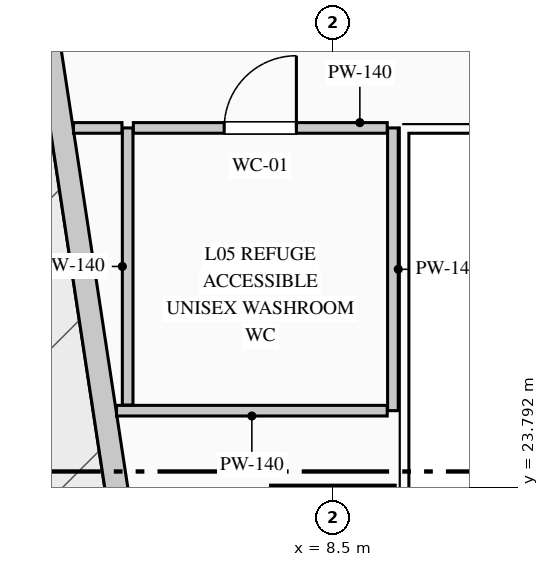
"""IFC4 building model, lengths in metres.
Left out: names, types, materials, properties, quantities, classifications, styles, units other than length and angle.
Written with IfcOpenShell. Run it as: python <this file> out.ifc"""

import sys

from ifc_helpers import new_model, si_unit, direction, frame, frame_2d, origin, place, context, subcontext, project, spatial, rectangle, extrude, element, fill, save


model = new_model("IFC4")
c1 = context("Model", 3, precision=1e-05, world=origin(), true_north=direction((0.0, 1.0)))
c2 = subcontext(c1, "Body", "Model", "MODEL_VIEW")
j1 = project(units=[si_unit("LENGTHUNIT", "METRE"), si_unit("PLANEANGLEUNIT", "RADIAN")], contexts=[c1])
p1 = place(None, origin())
s1 = spatial("IfcSite", under=j1, at=p1, CompositionType="ELEMENT")
p2 = place(p1, origin())
s2 = spatial("IfcBuilding", under=s1, at=p2, CompositionType="ELEMENT")
p3 = place(p2, frame((0.0, 0.0, 21.6)))
s3 = spatial("IfcBuildingStorey", under=s2, at=p3, CompositionType="ELEMENT", Elevation=21.6)
p4 = place(p3, frame((8.531, 4.85, 0.0), z_axis=(0.0, 0.0, 1.0), x_axis=(-0.150391137476, 0.988626575492, 0.0)))
e1 = element("IfcWall", 1, at=p4, inside=s3, PredefinedType="STANDARD", context=c2, shape_type="SweptSolid", body=[
    extrude(rectangle(XDim=36.718, YDim=0.3, at=frame_2d((18.359, 0.0))), origin(), (0.0, 0.0, 1.0), 5.0),
])
p5 = place(p3, frame((9.29, 28.52, 0.0), z_axis=(0.0, 0.0, 1.0), x_axis=(0.0, -1.0, 0.0)))
e2 = element("IfcWall", 2, at=p5, inside=s3, PredefinedType="PARTITIONING", context=c2, shape_type="SweptSolid", body=[
    extrude(rectangle(XDim=3.72, YDim=0.14, at=frame_2d((1.86, 0.0))), origin(), (0.0, 0.0, 1.0), 4.785),
])
p6 = place(p3, frame((9.215, 24.8, 0.0), z_axis=(0.0, 0.0, 1.0), x_axis=(-1.0, 0.0, 0.0)))
e3 = element("IfcWall", 3, at=p6, inside=s3, PredefinedType="PARTITIONING", context=c2, shape_type="SweptSolid", body=[
    extrude(rectangle(XDim=3.562, YDim=0.14, at=frame_2d((1.781, 0.0))), origin(), (0.0, 0.0, 1.0), 5.0),
])
p7 = place(p3, frame((5.8, 24.875, 0.0), z_axis=(0.0, 0.0, 1.0), x_axis=(0.0, 1.0, 0.0)))
e4 = element("IfcWall", 4, at=p7, inside=s3, PredefinedType="PARTITIONING", context=c2, shape_type="SweptSolid", body=[
    extrude(rectangle(XDim=3.645, YDim=0.14, at=frame_2d((1.823, 0.0))), origin(), (0.0, 0.0, 1.0), 5.0),
])
p8 = place(p3, frame((5.087, 28.52, 0.0), z_axis=(0.0, 0.0, 1.0), x_axis=(1.0, 0.0, 0.0)))
e5 = element("IfcWall", 5, at=p8, inside=s3, PredefinedType="PARTITIONING", context=c2, shape_type="SweptSolid", body=[
    extrude(rectangle(XDim=0.638, YDim=0.14, at=frame_2d((0.319, 0.0))), origin(), (0.0, 0.0, 1.0), 5.0),
])
p9 = place(p3, frame((5.875, 28.52, 0.0), z_axis=(0.0, 0.0, 1.0), x_axis=(1.0, 0.0, 0.0)))
e6 = element("IfcWall", 6, at=p9, inside=s3, PredefinedType="PARTITIONING", context=c2, shape_type="SweptSolid", body=[
    extrude(rectangle(XDim=3.34, YDim=0.14, at=frame_2d((1.67, 0.0))), origin(), (0.0, 0.0, 1.0), 5.0),
])
p10 = place(p9, frame((1.195, 0.0, 0.0)))
e7 = element("IfcOpeningElement", 7, at=p10, cuts=e6, PredefinedType="OPENING", context=c2, shape_type="SweptSolid", body=[
    extrude(rectangle(XDim=0.95, YDim=2.15, at=frame_2d((0.475, 1.075))), frame((0.0, 0.08, 0.0), z_axis=(0.0, -1.0, 0.0), x_axis=(1.0, 0.0, 0.0)), (0.0, 0.0, 1.0), 0.16),
])
p11 = place(p10, origin())
e8 = element("IfcDoor", 8, at=p11, inside=s3, OperationType="SINGLE_SWING_RIGHT", PredefinedType="DOOR", context=c2, shape_type="SweptSolid", body=[
    extrude(rectangle(XDim=0.95, YDim=2.15, at=frame_2d((0.475, 1.075))), frame((0.0, 0.025, 0.0), z_axis=(0.0, -1.0, 0.0), x_axis=(1.0, 0.0, 0.0)), (0.0, 0.0, 1.0), 0.05),
])
fill(e7, e8)
save(model, sys.argv[1])
